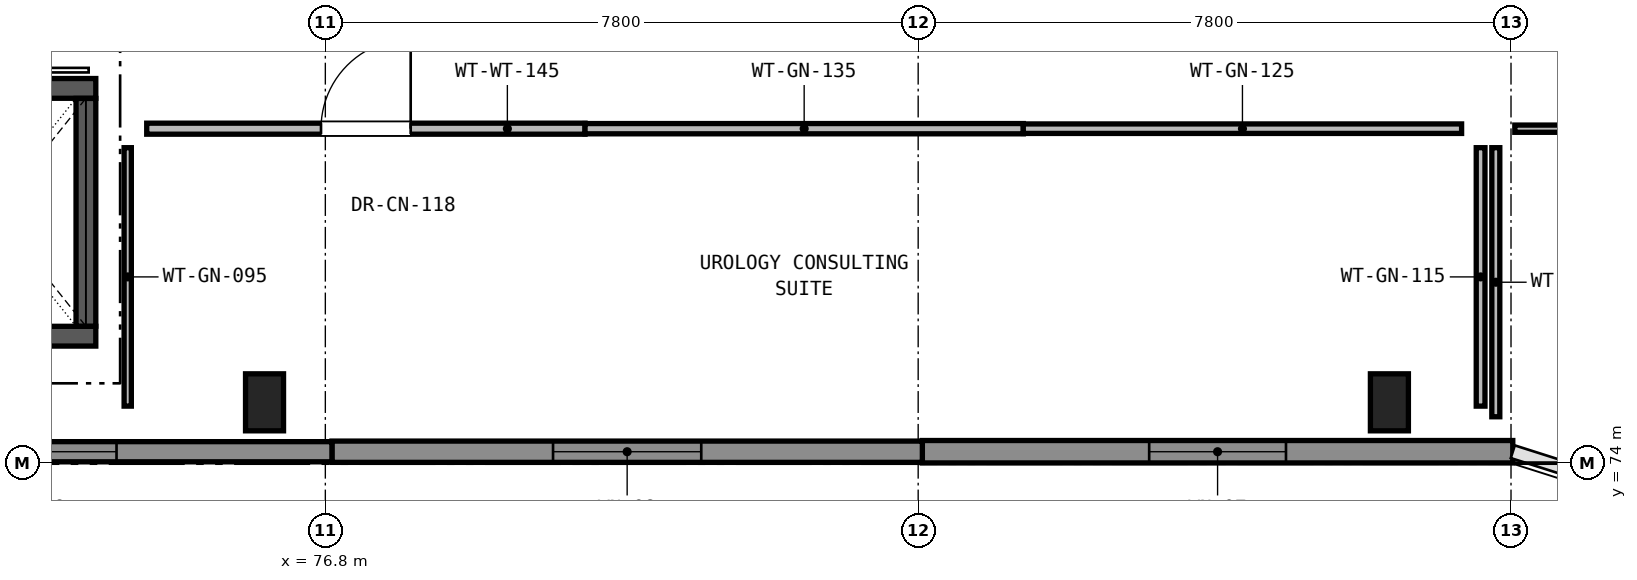
"""IFC4 building model, lengths in metres.
Left out: names, types, materials, properties, quantities, classifications, styles, units other than length and angle.
Written with IfcOpenShell. Run it as: python <this file> out.ifc"""

import sys

from ifc_helpers import new_model, si_unit, direction, frame, frame_2d, origin, origin_2d, place, context, subcontext, project, spatial, rectangle, extrude, element, fill, save


model = new_model("IFC4")
c1 = context("Model", 3, precision=1e-05, world=origin(), true_north=direction((0.0, 1.0)))
c2 = subcontext(c1, "Body", "Model", "MODEL_VIEW")
j1 = project(units=[si_unit("LENGTHUNIT", "METRE"), si_unit("PLANEANGLEUNIT", "RADIAN")], contexts=[c1])
p1 = place(None, origin())
s1 = spatial("IfcSite", under=j1, at=p1, CompositionType="ELEMENT")
p2 = place(p1, origin())
s2 = spatial("IfcBuilding", under=s1, at=p2, CompositionType="ELEMENT")
p3 = place(p2, frame((0.0, 0.0, 9.52)))
s3 = spatial("IfcBuildingStorey", under=s2, at=p3, CompositionType="ELEMENT", Elevation=9.52)
for number, where, z_axis, x_axis in (
    (1, (76.0, 74.8, 0.0), (0.0, 0.0, 1.0), (1.0, 0.0, 0.0)),
    (2, (90.8, 74.8, 0.0), (0.0, 0.0, 1.0), (1.0, 0.0, 0.0)),
):
    element("IfcColumn", number, at=place(p3, frame(where, z_axis=z_axis, x_axis=x_axis)), inside=s3, PredefinedType="COLUMN", context=c2, shape_type="SweptSolid", body=[
        extrude(rectangle(XDim=0.5, YDim=0.75, at=origin_2d()), origin(), (0.0, 0.0, 1.0), 4.08),
    ])
p4 = place(p3, frame((92.423, 74.15, 0.0), z_axis=(0.0, 0.0, 1.0), x_axis=(-1.0, 0.0, 0.0)))
e3 = element("IfcWall", 3, at=p4, inside=s3, PredefinedType="SOLIDWALL", context=c2, shape_type="SweptSolid", body=[
    extrude(rectangle(XDim=7.768, YDim=0.295, at=frame_2d((3.884, 0.0))), origin(), (0.0, 0.0, 1.0), 3.82),
])
p5 = place(p4, frame((2.984, 0.0, 0.9)))
e4 = element("IfcOpeningElement", 4, at=p5, cuts=e3, PredefinedType="OPENING", context=c2, shape_type="SweptSolid", body=[
    extrude(rectangle(XDim=1.8, YDim=1.5, at=frame_2d((0.9, 0.75))), frame((0.0, 0.157, 0.0), z_axis=(0.0, -1.0, 0.0), x_axis=(1.0, 0.0, 0.0)), (0.0, 0.0, 1.0), 0.315),
])
p6 = place(p3, frame((84.655, 74.15, 0.0), z_axis=(0.0, 0.0, 1.0), x_axis=(-1.0, 0.0, 0.0)))
e5 = element("IfcWall", 5, at=p6, inside=s3, PredefinedType="SOLIDWALL", context=c2, shape_type="SweptSolid", body=[
    extrude(rectangle(XDim=7.768, YDim=0.28, at=frame_2d((3.884, 0.0))), origin(), (0.0, 0.0, 1.0), 3.82),
])
p7 = place(p6, frame((2.909, 0.0, 0.9)))
e6 = element("IfcOpeningElement", 6, at=p7, cuts=e5, PredefinedType="OPENING", context=c2, shape_type="SweptSolid", body=[
    extrude(rectangle(XDim=1.95, YDim=1.5, at=frame_2d((0.975, 0.75))), frame((0.0, 0.15, 0.0), z_axis=(0.0, -1.0, 0.0), x_axis=(1.0, 0.0, 0.0)), (0.0, 0.0, 1.0), 0.3),
])
p8 = place(p3, frame((76.887, 74.15, 0.0), z_axis=(0.0, 0.0, 1.0), x_axis=(-1.0, 0.0, 0.0)))
e7 = element("IfcWall", 7, at=p8, inside=s3, PredefinedType="SOLIDWALL", context=c2, shape_type="SweptSolid", body=[
    extrude(rectangle(XDim=7.768, YDim=0.265, at=frame_2d((3.884, 0.0))), origin(), (0.0, 0.0, 1.0), 3.82),
])
p9 = place(p8, frame((2.834, 0.0, 0.9)))
e8 = element("IfcOpeningElement", 8, at=p9, cuts=e7, PredefinedType="OPENING", context=c2, shape_type="SweptSolid", body=[
    extrude(rectangle(XDim=2.1, YDim=1.5, at=frame_2d((1.05, 0.75))), frame((0.0, 0.142, 0.0), z_axis=(0.0, -1.0, 0.0), x_axis=(1.0, 0.0, 0.0)), (0.0, 0.0, 1.0), 0.285),
])
p10 = place(p3, frame((71.122, 75.67, 0.0), z_axis=(0.0, 0.0, 1.0), x_axis=(1.0, 0.0, 0.0)))
e9 = element("IfcWall", 9, at=p10, inside=s3, PredefinedType="SHEAR", context=c2, shape_type="SweptSolid", body=[
    extrude(rectangle(XDim=2.658, YDim=0.26, at=frame_2d((1.329, 0.0))), origin(), (0.0, 0.0, 1.0), 3.82),
])
p11 = place(p3, frame((71.122, 78.93, 0.0), z_axis=(0.0, 0.0, 1.0), x_axis=(1.0, 0.0, 0.0)))
e10 = element("IfcWall", 10, at=p11, inside=s3, PredefinedType="SHEAR", context=c2, shape_type="SweptSolid", body=[
    extrude(rectangle(XDim=2.658, YDim=0.26, at=frame_2d((1.329, 0.0))), origin(), (0.0, 0.0, 1.0), 3.82),
])
p12 = place(p11, frame((0.679, 0.0, 0.0)))
e11 = element("IfcOpeningElement", 11, at=p12, cuts=e10, PredefinedType="OPENING", context=c2, shape_type="SweptSolid", body=[
    extrude(rectangle(XDim=1.3, YDim=2.2, at=frame_2d((0.65, 1.1))), frame((0.0, 0.14, 0.0), z_axis=(0.0, -1.0, 0.0), x_axis=(1.0, 0.0, 0.0)), (0.0, 0.0, 1.0), 0.28),
])
p13 = place(p3, frame((73.65, 75.802, 0.0), z_axis=(0.0, 0.0, 1.0), x_axis=(0.0, 1.0, 0.0)))
e12 = element("IfcWall", 12, at=p13, inside=s3, PredefinedType="SHEAR", context=c2, shape_type="SweptSolid", body=[
    extrude(rectangle(XDim=2.996, YDim=0.26, at=frame_2d((1.498, 0.0))), origin(), (0.0, 0.0, 1.0), 3.82),
])
p14 = place(p3, frame((74.2, 74.75, 0.0), z_axis=(0.0, 0.0, 1.0), x_axis=(0.0, 1.0, 0.0)))
e13 = element("IfcWall", 13, at=p14, inside=s3, PredefinedType="PARTITIONING", context=c2, shape_type="SweptSolid", body=[
    extrude(rectangle(XDim=3.4, YDim=0.095, at=frame_2d((1.7, 0.0))), origin(), (0.0, 0.0, 1.0), 3.02),
])
p15 = place(p3, frame((74.45, 78.4, 0.0), z_axis=(0.0, 0.0, 1.0), x_axis=(1.0, 0.0, 0.0)))
e14 = element("IfcWall", 14, at=p15, inside=s3, PredefinedType="PARTITIONING", context=c2, shape_type="SweptSolid", body=[
    extrude(rectangle(XDim=5.767, YDim=0.145, at=frame_2d((2.884, 0.0))), origin(), (0.0, 0.0, 1.0), 3.02),
])
p16 = place(p15, frame((2.293, 0.0, 0.0)))
e15 = element("IfcOpeningElement", 15, at=p16, cuts=e14, PredefinedType="OPENING", context=c2, shape_type="SweptSolid", body=[
    extrude(rectangle(XDim=1.18, YDim=2.2, at=frame_2d((0.59, 1.1))), frame((0.0, 0.083, 0.0), z_axis=(0.0, -1.0, 0.0), x_axis=(1.0, 0.0, 0.0)), (0.0, 0.0, 1.0), 0.165),
])
p17 = place(p3, frame((80.217, 78.4, 0.0), z_axis=(0.0, 0.0, 1.0), x_axis=(1.0, 0.0, 0.0)))
e16 = element("IfcWall", 16, at=p17, inside=s3, PredefinedType="PARTITIONING", context=c2, shape_type="SweptSolid", body=[
    extrude(rectangle(XDim=5.766, YDim=0.135, at=frame_2d((2.883, 0.0))), origin(), (0.0, 0.0, 1.0), 3.82),
])
p18 = place(p3, frame((85.983, 78.4, 0.0), z_axis=(0.0, 0.0, 1.0), x_axis=(1.0, 0.0, 0.0)))
e17 = element("IfcWall", 17, at=p18, inside=s3, PredefinedType="PARTITIONING", context=c2, shape_type="SweptSolid", body=[
    extrude(rectangle(XDim=5.767, YDim=0.125, at=frame_2d((2.884, 0.0))), origin(), (0.0, 0.0, 1.0), 3.12),
])
p19 = place(p3, frame((92.0, 78.15, 0.0), z_axis=(0.0, 0.0, 1.0), x_axis=(0.0, -1.0, 0.0)))
e18 = element("IfcWall", 18, at=p19, inside=s3, PredefinedType="PARTITIONING", context=c2, shape_type="SweptSolid", body=[
    extrude(rectangle(XDim=3.4, YDim=0.115, at=frame_2d((1.7, 0.0))), origin(), (0.0, 0.0, 1.0), 3.22),
])
p20 = place(p3, frame((92.2, 74.61, 0.0), z_axis=(0.0, 0.0, 1.0), x_axis=(0.0, 1.0, 0.0)))
e19 = element("IfcWall", 19, at=p20, inside=s3, PredefinedType="PARTITIONING", context=c2, shape_type="SweptSolid", body=[
    extrude(rectangle(XDim=3.54, YDim=0.105, at=frame_2d((1.77, 0.0))), origin(), (0.0, 0.0, 1.0), 3.22),
])
p21 = place(p3, frame((92.45, 78.4, 0.0), z_axis=(0.0, 0.0, 1.0), x_axis=(1.0, 0.0, 0.0)))
e20 = element("IfcWall", 20, at=p21, inside=s3, PredefinedType="PARTITIONING", context=c2, shape_type="SweptSolid", body=[
    extrude(rectangle(XDim=6.783, YDim=0.095, at=frame_2d((3.392, 0.0))), origin(), (0.0, 0.0, 1.0), 3.22),
])
p22 = place(p21, frame((2.822, 0.0, 0.0)))
e21 = element("IfcOpeningElement", 21, at=p22, cuts=e20, PredefinedType="OPENING", context=c2, shape_type="SweptSolid", body=[
    extrude(rectangle(XDim=1.14, YDim=2.2, at=frame_2d((0.57, 1.1))), frame((0.0, 0.057, 0.0), z_axis=(0.0, -1.0, 0.0), x_axis=(1.0, 0.0, 0.0)), (0.0, 0.0, 1.0), 0.115),
])
p23 = place(p5, origin())
e22 = element("IfcWindow", 22, at=p23, inside=s3, PartitioningType="SINGLE_PANEL", PredefinedType="WINDOW", context=c2, shape_type="SweptSolid", body=[
    extrude(rectangle(XDim=1.8, YDim=1.5, at=frame_2d((0.9, 0.75))), frame((0.0, 0.03, 0.0), z_axis=(0.0, -1.0, 0.0), x_axis=(1.0, 0.0, 0.0)), (0.0, 0.0, 1.0), 0.06),
])
fill(e4, e22)
p24 = place(p7, origin())
e23 = element("IfcWindow", 23, at=p24, inside=s3, PartitioningType="SINGLE_PANEL", PredefinedType="WINDOW", context=c2, shape_type="SweptSolid", body=[
    extrude(rectangle(XDim=1.95, YDim=1.5, at=frame_2d((0.975, 0.75))), frame((0.0, 0.03, 0.0), z_axis=(0.0, -1.0, 0.0), x_axis=(1.0, 0.0, 0.0)), (0.0, 0.0, 1.0), 0.06),
])
fill(e6, e23)
p25 = place(p9, origin())
e24 = element("IfcWindow", 24, at=p25, inside=s3, PartitioningType="SINGLE_PANEL", PredefinedType="WINDOW", context=c2, shape_type="SweptSolid", body=[
    extrude(rectangle(XDim=2.1, YDim=1.5, at=frame_2d((1.05, 0.75))), frame((0.0, 0.03, 0.0), z_axis=(0.0, -1.0, 0.0), x_axis=(1.0, 0.0, 0.0)), (0.0, 0.0, 1.0), 0.06),
])
fill(e8, e24)
p26 = place(p16, origin())
e25 = element("IfcDoor", 25, at=p26, inside=s3, OperationType="SINGLE_SWING_RIGHT", PredefinedType="DOOR", context=c2, shape_type="SweptSolid", body=[
    extrude(rectangle(XDim=1.18, YDim=2.2, at=frame_2d((0.59, 1.1))), frame((0.0, 0.025, 0.0), z_axis=(0.0, -1.0, 0.0), x_axis=(1.0, 0.0, 0.0)), (0.0, 0.0, 1.0), 0.05),
])
fill(e15, e25)
save(model, sys.argv[1])
